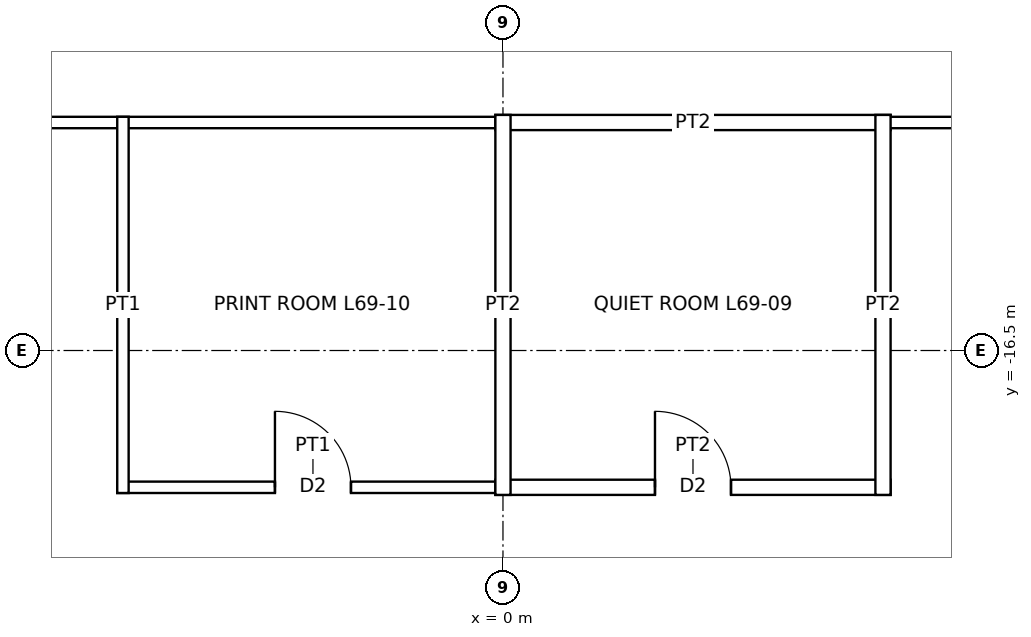
"""IFC4 building model, lengths in metres.
Left out: names, types, materials, properties, quantities, classifications, styles, units other than length and angle.
Written with IfcOpenShell. Run it as: python <this file> out.ifc"""

import sys

from ifc_helpers import new_model, si_unit, direction, frame, frame_2d, origin, place, context, subcontext, project, spatial, rectangle, extrude, element, fill, save


model = new_model("IFC4")
c1 = context("Model", 3, precision=1e-05, world=origin(), true_north=direction((0.0, 1.0)))
c2 = subcontext(c1, "Body", "Model", "MODEL_VIEW")
j1 = project(units=[si_unit("LENGTHUNIT", "METRE"), si_unit("PLANEANGLEUNIT", "RADIAN")], contexts=[c1])
p1 = place(None, origin())
s1 = spatial("IfcSite", under=j1, at=p1, CompositionType="ELEMENT")
p2 = place(p1, origin())
s2 = spatial("IfcBuilding", under=s1, at=p2, CompositionType="ELEMENT")
p3 = place(p2, frame((0.0, 0.0, 311.9)))
s3 = spatial("IfcBuildingStorey", under=s2, at=p3, CompositionType="ELEMENT", Elevation=311.9)
p4 = place(p3, frame((-5.075, -18.3, 0.0), z_axis=(0.0, 0.0, 1.0), x_axis=(1.0, 0.0, 0.0)))
e1 = element("IfcWall", 1, at=p4, inside=s3, PredefinedType="PARTITIONING", context=c2, shape_type="SweptSolid", body=[
    extrude(rectangle(XDim=5.15, YDim=0.15, at=frame_2d((2.575, 0.0))), origin(), (0.0, 0.0, 1.0), 3.85),
])
p5 = place(p4, frame((2.075, 0.0, 0.0)))
e2 = element("IfcOpeningElement", 2, at=p5, cuts=e1, PredefinedType="OPENING", context=c2, shape_type="SweptSolid", body=[
    extrude(rectangle(XDim=1.0, YDim=2.1, at=frame_2d((0.5, 1.05))), frame((0.0, 0.085, 0.0), z_axis=(0.0, -1.0, 0.0), x_axis=(1.0, 0.0, 0.0)), (0.0, 0.0, 1.0), 0.17),
])
p6 = place(p3, frame((-0.1, -18.3, 0.0), z_axis=(0.0, 0.0, 1.0), x_axis=(1.0, 0.0, 0.0)))
e3 = element("IfcWall", 3, at=p6, inside=s3, PredefinedType="PARTITIONING", context=c2, shape_type="SweptSolid", body=[
    extrude(rectangle(XDim=5.2, YDim=0.2, at=frame_2d((2.6, 0.0))), origin(), (0.0, 0.0, 1.0), 3.85),
])
p7 = place(p6, frame((2.1, 0.0, 0.0)))
e4 = element("IfcOpeningElement", 4, at=p7, cuts=e3, PredefinedType="OPENING", context=c2, shape_type="SweptSolid", body=[
    extrude(rectangle(XDim=1.0, YDim=2.1, at=frame_2d((0.5, 1.05))), frame((0.0, 0.11, 0.0), z_axis=(0.0, -1.0, 0.0), x_axis=(1.0, 0.0, 0.0)), (0.0, 0.0, 1.0), 0.22),
])
p8 = place(p3, frame((-13.575, -13.5, 0.0), z_axis=(0.0, 0.0, 1.0), x_axis=(1.0, 0.0, 0.0)))
e5 = element("IfcWall", 5, at=p8, inside=s3, PredefinedType="PARTITIONING", context=c2, shape_type="SweptSolid", body=[
    extrude(rectangle(XDim=13.65, YDim=0.15, at=frame_2d((6.825, 0.0))), origin(), (0.0, 0.0, 1.0), 3.85),
])
p9 = place(p8, frame((3.825, 0.0, 0.0)))
e6 = element("IfcOpeningElement", 6, at=p9, cuts=e5, PredefinedType="OPENING", context=c2, shape_type="SweptSolid", body=[
    extrude(rectangle(XDim=1.0, YDim=2.4, at=frame_2d((0.5, 1.2))), frame((0.0, 0.085, 0.0), z_axis=(0.0, -1.0, 0.0), x_axis=(1.0, 0.0, 0.0)), (0.0, 0.0, 1.0), 0.17),
])
p10 = place(p3, frame((-0.1, -13.5, 0.0), z_axis=(0.0, 0.0, 1.0), x_axis=(1.0, 0.0, 0.0)))
e7 = element("IfcWall", 7, at=p10, inside=s3, PredefinedType="PARTITIONING", context=c2, shape_type="SweptSolid", body=[
    extrude(rectangle(XDim=5.2, YDim=0.2, at=frame_2d((2.6, 0.0))), origin(), (0.0, 0.0, 1.0), 3.85),
])
p11 = place(p3, frame((4.925, -13.5, 0.0), z_axis=(0.0, 0.0, 1.0), x_axis=(1.0, 0.0, 0.0)))
e8 = element("IfcWall", 8, at=p11, inside=s3, PredefinedType="PARTITIONING", context=c2, shape_type="SweptSolid", body=[
    extrude(rectangle(XDim=7.15, YDim=0.15, at=frame_2d((3.575, 0.0))), origin(), (0.0, 0.0, 1.0), 3.85),
])
p12 = place(p3, frame((-5.0, -18.375, 0.0), z_axis=(0.0, 0.0, 1.0), x_axis=(0.0, 1.0, 0.0)))
e9 = element("IfcWall", 9, at=p12, inside=s3, PredefinedType="PARTITIONING", context=c2, shape_type="SweptSolid", body=[
    extrude(rectangle(XDim=4.95, YDim=0.15, at=frame_2d((2.475, 0.0))), origin(), (0.0, 0.0, 1.0), 3.85),
])
p13 = place(p3, frame((0.0, -18.4, 0.0), z_axis=(0.0, 0.0, 1.0), x_axis=(0.0, 1.0, 0.0)))
e10 = element("IfcWall", 10, at=p13, inside=s3, PredefinedType="PARTITIONING", context=c2, shape_type="SweptSolid", body=[
    extrude(rectangle(XDim=5.0, YDim=0.2, at=frame_2d((2.5, 0.0))), origin(), (0.0, 0.0, 1.0), 3.243),
])
p14 = place(p3, frame((5.0, -18.4, 0.0), z_axis=(0.0, 0.0, 1.0), x_axis=(0.0, 1.0, 0.0)))
e11 = element("IfcWall", 11, at=p14, inside=s3, PredefinedType="PARTITIONING", context=c2, shape_type="SweptSolid", body=[
    extrude(rectangle(XDim=5.0, YDim=0.2, at=frame_2d((2.5, 0.0))), origin(), (0.0, 0.0, 1.0), 3.85),
])
p15 = place(p7, origin())
e12 = element("IfcDoor", 12, at=p15, inside=s3, OperationType="SINGLE_SWING_LEFT", PredefinedType="DOOR", context=c2, shape_type="SweptSolid", body=[
    extrude(rectangle(XDim=1.0, YDim=2.1, at=frame_2d((0.5, 1.05))), frame((0.0, 0.025, 0.0), z_axis=(0.0, -1.0, 0.0), x_axis=(1.0, 0.0, 0.0)), (0.0, 0.0, 1.0), 0.05),
])
fill(e4, e12)
p16 = place(p5, origin())
e13 = element("IfcDoor", 13, at=p16, inside=s3, OperationType="SINGLE_SWING_LEFT", PredefinedType="DOOR", context=c2, shape_type="SweptSolid", body=[
    extrude(rectangle(XDim=1.0, YDim=2.1, at=frame_2d((0.5, 1.05))), frame((0.0, 0.025, 0.0), z_axis=(0.0, -1.0, 0.0), x_axis=(1.0, 0.0, 0.0)), (0.0, 0.0, 1.0), 0.05),
])
fill(e2, e13)
save(model, sys.argv[1])
